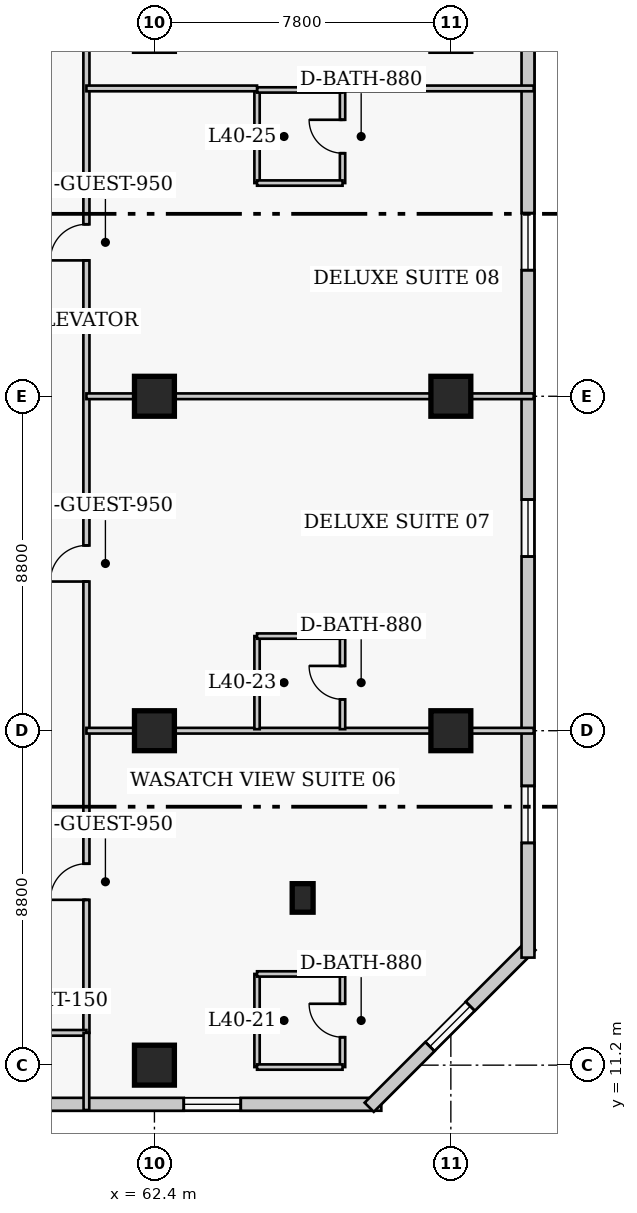
"""IFC4 building model, lengths in metres.
Left out: names, types, materials, properties, quantities, classifications, styles, units other than length and angle.
Written with IfcOpenShell. Run it as: python <this file> out.ifc"""

import sys

from ifc_helpers import new_model, si_unit, direction, frame, frame_2d, origin, origin_2d, place, context, subcontext, project, spatial, rectangle, extrude, element, fill, save


model = new_model("IFC4")
c1 = context("Model", 3, precision=1e-05, world=origin(), true_north=direction((0.0, 1.0)))
c2 = subcontext(c1, "Body", "Model", "MODEL_VIEW")
j1 = project(units=[si_unit("LENGTHUNIT", "METRE"), si_unit("PLANEANGLEUNIT", "RADIAN")], contexts=[c1])
p1 = place(None, origin())
s1 = spatial("IfcSite", under=j1, at=p1, CompositionType="ELEMENT")
p2 = place(p1, origin())
s2 = spatial("IfcBuilding", under=s1, at=p2, CompositionType="ELEMENT")
p3 = place(p2, frame((0.0, 0.0, 161.2)))
s3 = spatial("IfcBuildingStorey", under=s2, at=p3, CompositionType="ELEMENT", Elevation=161.2)
for number, where, z_axis, x_axis in (
    (1, (62.4, 11.2, 0.0), (0.0, 0.0, 1.0), (1.0, 0.0, 0.0)),
    (2, (62.4, 20.0, 0.0), (0.0, 0.0, 1.0), (1.0, 0.0, 0.0)),
    (3, (62.4, 28.8, 0.0), (0.0, 0.0, 1.0), (1.0, 0.0, 0.0)),
    (4, (70.2, 20.0, 0.0), (0.0, 0.0, 1.0), (1.0, 0.0, 0.0)),
    (5, (70.2, 28.8, 0.0), (0.0, 0.0, 1.0), (1.0, 0.0, 0.0)),
):
    element("IfcColumn", number, at=place(p3, frame(where, z_axis=z_axis, x_axis=x_axis)), inside=s3, PredefinedType="COLUMN", context=c2, shape_type="SweptSolid", body=[
        extrude(rectangle(XDim=1.05, YDim=1.05, at=origin_2d()), origin(), (0.0, 0.0, 1.0), 3.8),
    ])
p4 = place(p3, frame((66.3, 15.6, 0.0), z_axis=(0.0, 0.0, 1.0), x_axis=(1.0, 0.0, 0.0)))
e6 = element("IfcColumn", 6, at=p4, inside=s3, PredefinedType="PILASTER", context=c2, shape_type="SweptSolid", body=[
    extrude(rectangle(XDim=0.55, YDim=0.75, at=origin_2d()), origin(), (0.0, 0.0, 1.0), 3.8),
])
p5 = place(p3, frame((41.68, 10.17, 0.0), z_axis=(0.0, 0.0, 1.0), x_axis=(1.0, 0.0, 0.0)))
e7 = element("IfcWall", 7, at=p5, inside=s3, PredefinedType="SOLIDWALL", context=c2, shape_type="SweptSolid", body=[
    extrude(rectangle(XDim=26.69, YDim=0.34, at=frame_2d((13.345, 0.0))), origin(), (0.0, 0.0, 1.0), 3.55),
])
p6 = place(p5, frame((2.548, 0.0, 0.85)))
e8 = element("IfcOpeningElement", 8, at=p6, cuts=e7, PredefinedType="OPENING", context=c2, shape_type="SweptSolid", body=[
    extrude(rectangle(XDim=1.5, YDim=1.75, at=frame_2d((0.75, 0.875))), frame((0.0, 0.18, 0.0), z_axis=(0.0, -1.0, 0.0), x_axis=(1.0, 0.0, 0.0)), (0.0, 0.0, 1.0), 0.36),
])
p7 = place(p5, frame((13.745, 0.0, 0.85)))
e9 = element("IfcOpeningElement", 9, at=p7, cuts=e7, PredefinedType="OPENING", context=c2, shape_type="SweptSolid", body=[
    extrude(rectangle(XDim=1.5, YDim=1.75, at=frame_2d((0.75, 0.875))), frame((0.0, 0.18, 0.0), z_axis=(0.0, -1.0, 0.0), x_axis=(1.0, 0.0, 0.0)), (0.0, 0.0, 1.0), 0.36),
])
p8 = place(p5, frame((21.492, 0.0, 0.85)))
e10 = element("IfcOpeningElement", 10, at=p8, cuts=e7, PredefinedType="OPENING", context=c2, shape_type="SweptSolid", body=[
    extrude(rectangle(XDim=1.5, YDim=1.75, at=frame_2d((0.75, 0.875))), frame((0.0, 0.18, 0.0), z_axis=(0.0, -1.0, 0.0), x_axis=(1.0, 0.0, 0.0)), (0.0, 0.0, 1.0), 0.36),
])
p9 = place(p5, frame((8.42, 0.0, 0.0)))
e11 = element("IfcOpeningElement", 11, at=p9, cuts=e7, PredefinedType="OPENING", context=c2, shape_type="SweptSolid", body=[
    extrude(rectangle(XDim=1.2, YDim=2.1, at=frame_2d((0.6, 1.05))), frame((0.0, 0.18, 0.0), z_axis=(0.0, -1.0, 0.0), x_axis=(1.0, 0.0, 0.0)), (0.0, 0.0, 1.0), 0.36),
])
p10 = place(p3, frame((68.052, 10.092, 0.0), z_axis=(0.0, 0.0, 1.0), x_axis=(0.707106781187, 0.707106781187, 0.0)))
e12 = element("IfcWall", 12, at=p10, inside=s3, PredefinedType="SOLIDWALL", context=c2, shape_type="SweptSolid", body=[
    extrude(rectangle(XDim=6.02, YDim=0.34, at=frame_2d((3.01, 0.0))), origin(), (0.0, 0.0, 1.0), 3.55),
])
p11 = place(p10, frame((2.26, 0.0, 0.85)))
e13 = element("IfcOpeningElement", 13, at=p11, cuts=e12, PredefinedType="OPENING", context=c2, shape_type="SweptSolid", body=[
    extrude(rectangle(XDim=1.5, YDim=1.75, at=frame_2d((0.75, 0.875))), frame((0.0, 0.18, 0.0), z_axis=(0.0, -1.0, 0.0), x_axis=(1.0, 0.0, 0.0)), (0.0, 0.0, 1.0), 0.36),
])
p12 = place(p3, frame((72.23, 14.03, 0.0), z_axis=(0.0, 0.0, 1.0), x_axis=(0.0, 1.0, 0.0)))
e14 = element("IfcWall", 14, at=p12, inside=s3, PredefinedType="SOLIDWALL", context=c2, shape_type="SweptSolid", body=[
    extrude(rectangle(XDim=30.14, YDim=0.34, at=frame_2d((15.07, 0.0))), origin(), (0.0, 0.0, 1.0), 3.55),
])
p13 = place(p12, frame((3.018, 0.0, 0.85)))
e15 = element("IfcOpeningElement", 15, at=p13, cuts=e14, PredefinedType="OPENING", context=c2, shape_type="SweptSolid", body=[
    extrude(rectangle(XDim=1.5, YDim=1.75, at=frame_2d((0.75, 0.875))), frame((0.0, 0.18, 0.0), z_axis=(0.0, -1.0, 0.0), x_axis=(1.0, 0.0, 0.0)), (0.0, 0.0, 1.0), 0.36),
])
p14 = place(p12, frame((10.552, 0.0, 0.85)))
e16 = element("IfcOpeningElement", 16, at=p14, cuts=e14, PredefinedType="OPENING", context=c2, shape_type="SweptSolid", body=[
    extrude(rectangle(XDim=1.5, YDim=1.75, at=frame_2d((0.75, 0.875))), frame((0.0, 0.18, 0.0), z_axis=(0.0, -1.0, 0.0), x_axis=(1.0, 0.0, 0.0)), (0.0, 0.0, 1.0), 0.36),
])
p15 = place(p12, frame((18.087, 0.0, 0.85)))
e17 = element("IfcOpeningElement", 17, at=p15, cuts=e14, PredefinedType="OPENING", context=c2, shape_type="SweptSolid", body=[
    extrude(rectangle(XDim=1.5, YDim=1.75, at=frame_2d((0.75, 0.875))), frame((0.0, 0.18, 0.0), z_axis=(0.0, -1.0, 0.0), x_axis=(1.0, 0.0, 0.0)), (0.0, 0.0, 1.0), 0.36),
])
p16 = place(p12, frame((25.623, 0.0, 0.85)))
e18 = element("IfcOpeningElement", 18, at=p16, cuts=e14, PredefinedType="OPENING", context=c2, shape_type="SweptSolid", body=[
    extrude(rectangle(XDim=1.5, YDim=1.75, at=frame_2d((0.75, 0.875))), frame((0.0, 0.18, 0.0), z_axis=(0.0, -1.0, 0.0), x_axis=(1.0, 0.0, 0.0)), (0.0, 0.0, 1.0), 0.36),
])
p17 = place(p3, frame((60.61, 12.05, 0.0), z_axis=(0.0, 0.0, 1.0), x_axis=(0.0, 1.0, 0.0)))
e19 = element("IfcWall", 19, at=p17, inside=s3, PredefinedType="PARTITIONING", context=c2, shape_type="SweptSolid", body=[
    extrude(rectangle(XDim=28.6, YDim=0.16, at=frame_2d((14.3, 0.0))), origin(), (0.0, 0.0, 1.0), 3.55),
])
p18 = place(p17, frame((3.5, 0.0, 0.0)))
e20 = element("IfcOpeningElement", 20, at=p18, cuts=e19, PredefinedType="OPENING", context=c2, shape_type="SweptSolid", body=[
    extrude(rectangle(XDim=0.95, YDim=2.1, at=frame_2d((0.475, 1.05))), frame((0.0, 0.09, 0.0), z_axis=(0.0, -1.0, 0.0), x_axis=(1.0, 0.0, 0.0)), (0.0, 0.0, 1.0), 0.18),
])
p19 = place(p17, frame((11.875, 0.0, 0.0)))
e21 = element("IfcOpeningElement", 21, at=p19, cuts=e19, PredefinedType="OPENING", context=c2, shape_type="SweptSolid", body=[
    extrude(rectangle(XDim=0.95, YDim=2.1, at=frame_2d((0.475, 1.05))), frame((0.0, 0.09, 0.0), z_axis=(0.0, -1.0, 0.0), x_axis=(1.0, 0.0, 0.0)), (0.0, 0.0, 1.0), 0.18),
])
p20 = place(p17, frame((20.325, 0.0, 0.0)))
e22 = element("IfcOpeningElement", 22, at=p20, cuts=e19, PredefinedType="OPENING", context=c2, shape_type="SweptSolid", body=[
    extrude(rectangle(XDim=0.95, YDim=2.1, at=frame_2d((0.475, 1.05))), frame((0.0, 0.09, 0.0), z_axis=(0.0, -1.0, 0.0), x_axis=(1.0, 0.0, 0.0)), (0.0, 0.0, 1.0), 0.18),
])
p21 = place(p17, frame((27.16, 0.0, 0.0)))
e23 = element("IfcOpeningElement", 23, at=p21, cuts=e19, PredefinedType="OPENING", context=c2, shape_type="SweptSolid", body=[
    extrude(rectangle(XDim=1.0, YDim=2.15, at=frame_2d((0.5, 1.075))), frame((0.0, 0.09, 0.0), z_axis=(0.0, -1.0, 0.0), x_axis=(1.0, 0.0, 0.0)), (0.0, 0.0, 1.0), 0.18),
])
p22 = place(p3, frame((58.39, 12.05, 0.0), z_axis=(0.0, 0.0, 1.0), x_axis=(1.0, 0.0, 0.0)))
e24 = element("IfcWall", 24, at=p22, inside=s3, PredefinedType="PARTITIONING", context=c2, shape_type="SweptSolid", body=[
    extrude(rectangle(XDim=2.22, YDim=0.15, at=frame_2d((1.11, 0.0))), origin(), (0.0, 0.0, 1.0), 3.55),
])
p23 = place(p3, frame((60.61, 10.02, 0.0), z_axis=(0.0, 0.0, 1.0), x_axis=(0.0, 1.0, 0.0)))
e25 = element("IfcWall", 25, at=p23, inside=s3, PredefinedType="PARTITIONING", context=c2, shape_type="SweptSolid", body=[
    extrude(rectangle(XDim=2.03, YDim=0.15, at=frame_2d((1.015, 0.0))), origin(), (0.0, 0.0, 1.0), 3.55),
])
p24 = place(p3, frame((65.1, 11.15, 0.0), z_axis=(0.0, 0.0, 1.0), x_axis=(0.0, 1.0, 0.0)))
e26 = element("IfcWall", 26, at=p24, inside=s3, PredefinedType="PLUMBINGWALL", context=c2, shape_type="SweptSolid", body=[
    extrude(rectangle(XDim=2.45, YDim=0.14, at=frame_2d((1.225, 0.0))), origin(), (0.0, 0.0, 1.0), 3.55),
])
p25 = place(p3, frame((67.35, 11.15, 0.0), z_axis=(0.0, 0.0, 1.0), x_axis=(0.0, 1.0, 0.0)))
e27 = element("IfcWall", 27, at=p25, inside=s3, PredefinedType="PLUMBINGWALL", context=c2, shape_type="SweptSolid", body=[
    extrude(rectangle(XDim=2.45, YDim=0.14, at=frame_2d((1.225, 0.0))), origin(), (0.0, 0.0, 1.0), 3.55),
])
p26 = place(p25, frame((0.785, 0.0, 0.0)))
e28 = element("IfcOpeningElement", 28, at=p26, cuts=e27, PredefinedType="OPENING", context=c2, shape_type="SweptSolid", body=[
    extrude(rectangle(XDim=0.88, YDim=2.05, at=frame_2d((0.44, 1.025))), frame((0.0, 0.08, 0.0), z_axis=(0.0, -1.0, 0.0), x_axis=(1.0, 0.0, 0.0)), (0.0, 0.0, 1.0), 0.16),
])
for number, where, z_axis, x_axis in (
    (29, (65.1, 11.15, 0.0), (0.0, 0.0, 1.0), (1.0, 0.0, 0.0)),
    (30, (65.1, 13.6, 0.0), (0.0, 0.0, 1.0), (1.0, 0.0, 0.0)),
):
    element("IfcWall", number, at=place(p3, frame(where, z_axis=z_axis, x_axis=x_axis)), inside=s3, PredefinedType="PLUMBINGWALL", context=c2, shape_type="SweptSolid", body=[
        extrude(rectangle(XDim=2.25, YDim=0.14, at=frame_2d((1.125, 0.0))), origin(), (0.0, 0.0, 1.0), 3.55),
    ])
p27 = place(p3, frame((60.61, 20.0, 0.0), z_axis=(0.0, 0.0, 1.0), x_axis=(1.0, 0.0, 0.0)))
e31 = element("IfcWall", 31, at=p27, inside=s3, PredefinedType="PARTITIONING", context=c2, shape_type="SweptSolid", body=[
    extrude(rectangle(XDim=11.77, YDim=0.15, at=frame_2d((5.885, 0.0))), origin(), (0.0, 0.0, 1.0), 2.778),
])
p28 = place(p3, frame((65.1, 20.04, 0.0), z_axis=(0.0, 0.0, 1.0), x_axis=(0.0, 1.0, 0.0)))
e32 = element("IfcWall", 32, at=p28, inside=s3, PredefinedType="PLUMBINGWALL", context=c2, shape_type="SweptSolid", body=[
    extrude(rectangle(XDim=2.45, YDim=0.14, at=frame_2d((1.225, 0.0))), origin(), (0.0, 0.0, 1.0), 3.55),
])
p29 = place(p3, frame((67.35, 20.04, 0.0), z_axis=(0.0, 0.0, 1.0), x_axis=(0.0, 1.0, 0.0)))
e33 = element("IfcWall", 33, at=p29, inside=s3, PredefinedType="PLUMBINGWALL", context=c2, shape_type="SweptSolid", body=[
    extrude(rectangle(XDim=2.45, YDim=0.14, at=frame_2d((1.225, 0.0))), origin(), (0.0, 0.0, 1.0), 3.55),
])
p30 = place(p29, frame((0.785, 0.0, 0.0)))
e34 = element("IfcOpeningElement", 34, at=p30, cuts=e33, PredefinedType="OPENING", context=c2, shape_type="SweptSolid", body=[
    extrude(rectangle(XDim=0.88, YDim=2.05, at=frame_2d((0.44, 1.025))), frame((0.0, 0.08, 0.0), z_axis=(0.0, -1.0, 0.0), x_axis=(1.0, 0.0, 0.0)), (0.0, 0.0, 1.0), 0.16),
])
p31 = place(p3, frame((65.1, 22.49, 0.0), z_axis=(0.0, 0.0, 1.0), x_axis=(1.0, 0.0, 0.0)))
e35 = element("IfcWall", 35, at=p31, inside=s3, PredefinedType="PLUMBINGWALL", context=c2, shape_type="SweptSolid", body=[
    extrude(rectangle(XDim=2.25, YDim=0.14, at=frame_2d((1.125, 0.0))), origin(), (0.0, 0.0, 1.0), 3.55),
])
p32 = place(p3, frame((60.61, 28.8, 0.0), z_axis=(0.0, 0.0, 1.0), x_axis=(1.0, 0.0, 0.0)))
e36 = element("IfcWall", 36, at=p32, inside=s3, PredefinedType="PARTITIONING", context=c2, shape_type="SweptSolid", body=[
    extrude(rectangle(XDim=11.77, YDim=0.15, at=frame_2d((5.885, 0.0))), origin(), (0.0, 0.0, 1.0), 2.778),
])
p33 = place(p3, frame((65.1, 34.41, 0.0), z_axis=(0.0, 0.0, 1.0), x_axis=(0.0, 1.0, 0.0)))
e37 = element("IfcWall", 37, at=p33, inside=s3, PredefinedType="PLUMBINGWALL", context=c2, shape_type="SweptSolid", body=[
    extrude(rectangle(XDim=2.45, YDim=0.14, at=frame_2d((1.225, 0.0))), origin(), (0.0, 0.0, 1.0), 3.55),
])
p34 = place(p3, frame((67.35, 34.41, 0.0), z_axis=(0.0, 0.0, 1.0), x_axis=(0.0, 1.0, 0.0)))
e38 = element("IfcWall", 38, at=p34, inside=s3, PredefinedType="PLUMBINGWALL", context=c2, shape_type="SweptSolid", body=[
    extrude(rectangle(XDim=2.45, YDim=0.14, at=frame_2d((1.225, 0.0))), origin(), (0.0, 0.0, 1.0), 3.55),
])
p35 = place(p34, frame((0.785, 0.0, 0.0)))
e39 = element("IfcOpeningElement", 39, at=p35, cuts=e38, PredefinedType="OPENING", context=c2, shape_type="SweptSolid", body=[
    extrude(rectangle(XDim=0.88, YDim=2.05, at=frame_2d((0.44, 1.025))), frame((0.0, 0.08, 0.0), z_axis=(0.0, -1.0, 0.0), x_axis=(1.0, 0.0, 0.0)), (0.0, 0.0, 1.0), 0.16),
])
for number, where, z_axis, x_axis in (
    (40, (65.1, 34.41, 0.0), (0.0, 0.0, 1.0), (1.0, 0.0, 0.0)),
    (41, (65.1, 36.86, 0.0), (0.0, 0.0, 1.0), (1.0, 0.0, 0.0)),
):
    element("IfcWall", number, at=place(p3, frame(where, z_axis=z_axis, x_axis=x_axis)), inside=s3, PredefinedType="PLUMBINGWALL", context=c2, shape_type="SweptSolid", body=[
        extrude(rectangle(XDim=2.25, YDim=0.14, at=frame_2d((1.125, 0.0))), origin(), (0.0, 0.0, 1.0), 3.55),
    ])
p36 = place(p3, frame((60.61, 36.9, 0.0), z_axis=(0.0, 0.0, 1.0), x_axis=(1.0, 0.0, 0.0)))
e42 = element("IfcWall", 42, at=p36, inside=s3, PredefinedType="PARTITIONING", context=c2, shape_type="SweptSolid", body=[
    extrude(rectangle(XDim=4.49, YDim=0.15, at=frame_2d((2.245, 0.0))), origin(), (0.0, 0.0, 1.0), 3.55),
])
p37 = place(p3, frame((67.35, 36.9, 0.0), z_axis=(0.0, 0.0, 1.0), x_axis=(1.0, 0.0, 0.0)))
e43 = element("IfcWall", 43, at=p37, inside=s3, PredefinedType="PARTITIONING", context=c2, shape_type="SweptSolid", body=[
    extrude(rectangle(XDim=5.03, YDim=0.15, at=frame_2d((2.515, 0.0))), origin(), (0.0, 0.0, 1.0), 3.55),
])
p38 = place(p8, origin())
e44 = element("IfcWindow", 44, at=p38, inside=s3, PartitioningType="SINGLE_PANEL", PredefinedType="WINDOW", context=c2, shape_type="SweptSolid", body=[
    extrude(rectangle(XDim=1.5, YDim=1.75, at=frame_2d((0.75, 0.875))), frame((0.0, 0.03, 0.0), z_axis=(0.0, -1.0, 0.0), x_axis=(1.0, 0.0, 0.0)), (0.0, 0.0, 1.0), 0.06),
])
fill(e10, e44)
p39 = place(p11, origin())
e45 = element("IfcWindow", 45, at=p39, inside=s3, PartitioningType="SINGLE_PANEL", PredefinedType="WINDOW", context=c2, shape_type="SweptSolid", body=[
    extrude(rectangle(XDim=1.5, YDim=1.75, at=frame_2d((0.75, 0.875))), frame((0.0, 0.03, 0.0), z_axis=(0.0, -1.0, 0.0), x_axis=(1.0, 0.0, 0.0)), (0.0, 0.0, 1.0), 0.06),
])
fill(e13, e45)
p40 = place(p13, origin())
e46 = element("IfcWindow", 46, at=p40, inside=s3, PartitioningType="SINGLE_PANEL", PredefinedType="WINDOW", context=c2, shape_type="SweptSolid", body=[
    extrude(rectangle(XDim=1.5, YDim=1.75, at=frame_2d((0.75, 0.875))), frame((0.0, 0.03, 0.0), z_axis=(0.0, -1.0, 0.0), x_axis=(1.0, 0.0, 0.0)), (0.0, 0.0, 1.0), 0.06),
])
fill(e15, e46)
p41 = place(p14, origin())
e47 = element("IfcWindow", 47, at=p41, inside=s3, PartitioningType="SINGLE_PANEL", PredefinedType="WINDOW", context=c2, shape_type="SweptSolid", body=[
    extrude(rectangle(XDim=1.5, YDim=1.75, at=frame_2d((0.75, 0.875))), frame((0.0, 0.03, 0.0), z_axis=(0.0, -1.0, 0.0), x_axis=(1.0, 0.0, 0.0)), (0.0, 0.0, 1.0), 0.06),
])
fill(e16, e47)
p42 = place(p15, origin())
e48 = element("IfcWindow", 48, at=p42, inside=s3, PartitioningType="SINGLE_PANEL", PredefinedType="WINDOW", context=c2, shape_type="SweptSolid", body=[
    extrude(rectangle(XDim=1.5, YDim=1.75, at=frame_2d((0.75, 0.875))), frame((0.0, 0.03, 0.0), z_axis=(0.0, -1.0, 0.0), x_axis=(1.0, 0.0, 0.0)), (0.0, 0.0, 1.0), 0.06),
])
fill(e17, e48)
p43 = place(p26, origin())
e49 = element("IfcDoor", 49, at=p43, inside=s3, OperationType="SINGLE_SWING_RIGHT", PredefinedType="DOOR", context=c2, shape_type="SweptSolid", body=[
    extrude(rectangle(XDim=0.88, YDim=2.05, at=frame_2d((0.44, 1.025))), frame((0.0, 0.025, 0.0), z_axis=(0.0, -1.0, 0.0), x_axis=(1.0, 0.0, 0.0)), (0.0, 0.0, 1.0), 0.05),
])
fill(e28, e49)
p44 = place(p18, origin())
e50 = element("IfcDoor", 50, at=p44, inside=s3, OperationType="SINGLE_SWING_LEFT", PredefinedType="DOOR", context=c2, shape_type="SweptSolid", body=[
    extrude(rectangle(XDim=0.95, YDim=2.1, at=frame_2d((0.475, 1.05))), frame((0.0, 0.025, 0.0), z_axis=(0.0, -1.0, 0.0), x_axis=(1.0, 0.0, 0.0)), (0.0, 0.0, 1.0), 0.05),
])
fill(e20, e50)
p45 = place(p30, origin())
e51 = element("IfcDoor", 51, at=p45, inside=s3, OperationType="SINGLE_SWING_RIGHT", PredefinedType="DOOR", context=c2, shape_type="SweptSolid", body=[
    extrude(rectangle(XDim=0.88, YDim=2.05, at=frame_2d((0.44, 1.025))), frame((0.0, 0.025, 0.0), z_axis=(0.0, -1.0, 0.0), x_axis=(1.0, 0.0, 0.0)), (0.0, 0.0, 1.0), 0.05),
])
fill(e34, e51)
p46 = place(p19, origin())
e52 = element("IfcDoor", 52, at=p46, inside=s3, OperationType="SINGLE_SWING_LEFT", PredefinedType="DOOR", context=c2, shape_type="SweptSolid", body=[
    extrude(rectangle(XDim=0.95, YDim=2.1, at=frame_2d((0.475, 1.05))), frame((0.0, 0.025, 0.0), z_axis=(0.0, -1.0, 0.0), x_axis=(1.0, 0.0, 0.0)), (0.0, 0.0, 1.0), 0.05),
])
fill(e21, e52)
p47 = place(p35, origin())
e53 = element("IfcDoor", 53, at=p47, inside=s3, OperationType="SINGLE_SWING_RIGHT", PredefinedType="DOOR", context=c2, shape_type="SweptSolid", body=[
    extrude(rectangle(XDim=0.88, YDim=2.05, at=frame_2d((0.44, 1.025))), frame((0.0, 0.025, 0.0), z_axis=(0.0, -1.0, 0.0), x_axis=(1.0, 0.0, 0.0)), (0.0, 0.0, 1.0), 0.05),
])
fill(e39, e53)
p48 = place(p20, origin())
e54 = element("IfcDoor", 54, at=p48, inside=s3, OperationType="SINGLE_SWING_LEFT", PredefinedType="DOOR", context=c2, shape_type="SweptSolid", body=[
    extrude(rectangle(XDim=0.95, YDim=2.1, at=frame_2d((0.475, 1.05))), frame((0.0, 0.025, 0.0), z_axis=(0.0, -1.0, 0.0), x_axis=(1.0, 0.0, 0.0)), (0.0, 0.0, 1.0), 0.05),
])
fill(e22, e54)
save(model, sys.argv[1])
